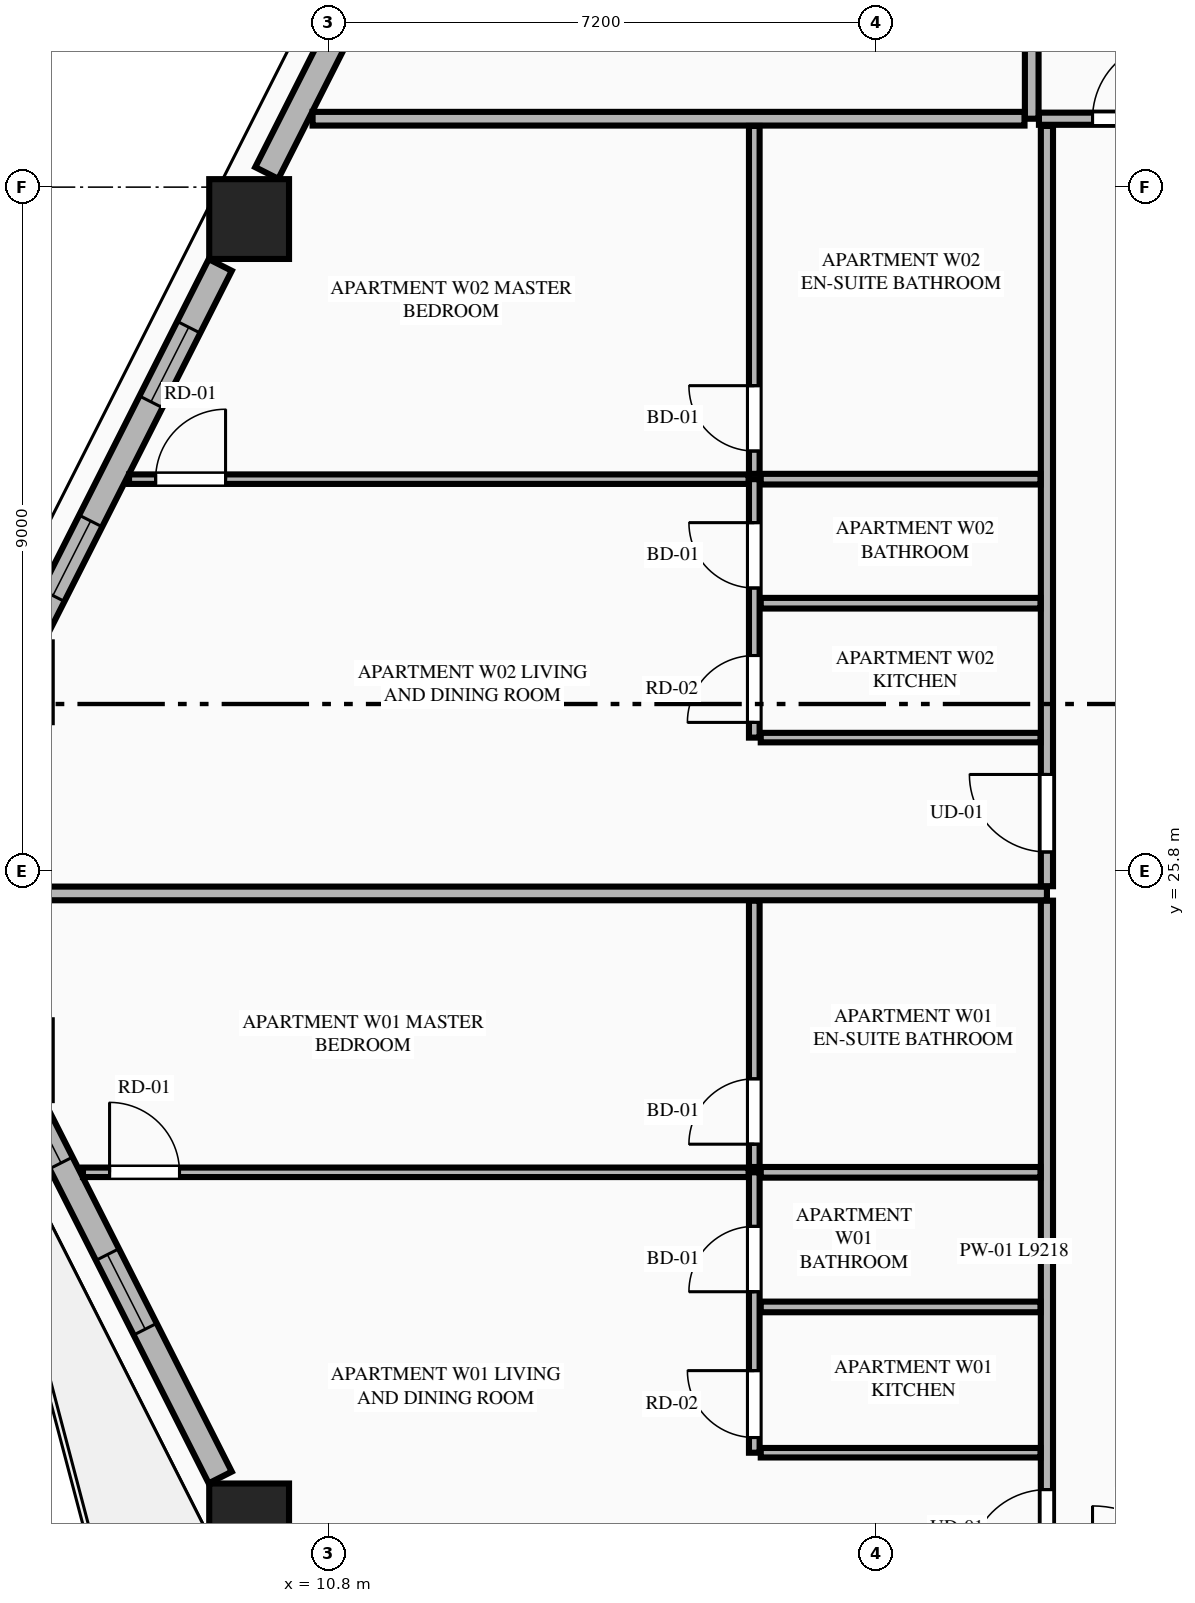
"""IFC4 building model, lengths in metres.
Left out: names, types, materials, properties, quantities, classifications, styles, units other than length and angle.
Written with IfcOpenShell. Run it as: python <this file> out.ifc"""

import sys

from ifc_helpers import new_model, si_unit, direction, frame, frame_2d, origin, origin_2d, place, context, subcontext, project, spatial, rectangle, extrude, element, fill, save


model = new_model("IFC4")
c1 = context("Model", 3, precision=1e-05, world=origin(), true_north=direction((0.0, 1.0)))
c2 = subcontext(c1, "Body", "Model", "MODEL_VIEW")
j1 = project(units=[si_unit("LENGTHUNIT", "METRE"), si_unit("PLANEANGLEUNIT", "RADIAN")], contexts=[c1])
p1 = place(None, origin())
s1 = spatial("IfcSite", under=j1, at=p1, CompositionType="ELEMENT")
p2 = place(p1, origin())
s2 = spatial("IfcBuilding", under=s1, at=p2, CompositionType="ELEMENT")
p3 = place(p2, frame((0.0, 0.0, 90.65)))
s3 = spatial("IfcBuildingStorey", under=s2, at=p3, CompositionType="ELEMENT", Elevation=90.65)
for number, where, z_axis, x_axis in (
    (1, (9.754, 34.38, 0.0), (0.0, 0.0, 1.0), (1.0, 0.0, 0.0)),
    (2, (9.754, 17.22, 0.0), (0.0, 0.0, 1.0), (1.0, 0.0, 0.0)),
):
    element("IfcColumn", number, at=place(p3, frame(where, z_axis=z_axis, x_axis=x_axis)), inside=s3, PredefinedType="COLUMN", context=c2, shape_type="SweptSolid", body=[
        extrude(rectangle(XDim=1.05, YDim=1.05, at=origin_2d()), origin(), (0.0, 0.0, 1.0), 3.55),
    ])
p4 = place(p3, frame((12.567, 40.085, 0.0), z_axis=(0.0, 0.0, 1.0), x_axis=(-0.451599886425, -0.892220568347, 0.0)))
e3 = element("IfcWall", 3, at=p4, inside=s3, PredefinedType="STANDARD", context=c2, shape_type="SweptSolid", body=[
    extrude(rectangle(XDim=5.715, YDim=0.34, at=frame_2d((2.857, 0.0))), origin(), (0.0, 0.0, 1.0), 2.712),
])
p5 = place(p4, frame((2.308, 0.0, 0.75)))
e4 = element("IfcOpeningElement", 4, at=p5, cuts=e3, PredefinedType="OPENING", context=c2, shape_type="SweptSolid", body=[
    extrude(rectangle(XDim=1.1, YDim=1.812, at=frame_2d((0.55, 0.906))), frame((0.0, 0.18, 0.0), z_axis=(0.0, -1.0, 0.0), x_axis=(1.0, 0.0, 0.0)), (0.0, 0.0, 1.0), 0.36),
])
p6 = place(p3, frame((9.374, 33.776, 0.0), z_axis=(0.0, 0.0, 1.0), x_axis=(-0.451597066012, -0.892221995901, 0.0)))
e5 = element("IfcWall", 5, at=p6, inside=s3, PredefinedType="STANDARD", context=c2, shape_type="SweptSolid", body=[
    extrude(rectangle(XDim=5.474, YDim=0.34, at=frame_2d((2.737, 0.0))), origin(), (0.0, 0.0, 1.0), 2.712),
])
p7 = place(p6, frame((0.918, 0.0, 0.75)))
e6 = element("IfcOpeningElement", 6, at=p7, cuts=e5, PredefinedType="OPENING", context=c2, shape_type="SweptSolid", body=[
    extrude(rectangle(XDim=1.1, YDim=1.812, at=frame_2d((0.55, 0.906))), frame((0.0, 0.18, 0.0), z_axis=(0.0, -1.0, 0.0), x_axis=(1.0, 0.0, 0.0)), (0.0, 0.0, 1.0), 0.36),
])
p8 = place(p6, frame((3.775, 0.0, 0.75)))
e7 = element("IfcOpeningElement", 7, at=p8, cuts=e5, PredefinedType="OPENING", context=c2, shape_type="SweptSolid", body=[
    extrude(rectangle(XDim=1.1, YDim=1.812, at=frame_2d((0.55, 0.906))), frame((0.0, 0.18, 0.0), z_axis=(0.0, -1.0, 0.0), x_axis=(1.0, 0.0, 0.0)), (0.0, 0.0, 1.0), 0.36),
])
p9 = place(p3, frame((6.902, 22.708, 0.0), z_axis=(0.0, 0.0, 1.0), x_axis=(0.451579095309, -0.892231091523, 0.0)))
e8 = element("IfcWall", 8, at=p9, inside=s3, PredefinedType="STANDARD", context=c2, shape_type="SweptSolid", body=[
    extrude(rectangle(XDim=5.474, YDim=0.34, at=frame_2d((2.737, 0.0))), origin(), (0.0, 0.0, 1.0), 2.712),
])
p10 = place(p9, frame((2.187, 0.0, 0.75)))
e9 = element("IfcOpeningElement", 9, at=p10, cuts=e8, PredefinedType="OPENING", context=c2, shape_type="SweptSolid", body=[
    extrude(rectangle(XDim=1.1, YDim=1.812, at=frame_2d((0.55, 0.906))), frame((0.0, 0.18, 0.0), z_axis=(0.0, -1.0, 0.0), x_axis=(1.0, 0.0, 0.0)), (0.0, 0.0, 1.0), 0.36),
])
p11 = place(p9, frame((0.21, 0.0, 0.75)))
e10 = element("IfcOpeningElement", 10, at=p11, cuts=e8, PredefinedType="OPENING", context=c2, shape_type="SweptSolid", body=[
    extrude(rectangle(XDim=0.626, YDim=1.812, at=frame_2d((0.313, 0.906))), frame((0.0, 0.18, 0.0), z_axis=(0.0, -1.0, 0.0), x_axis=(1.0, 0.0, 0.0)), (0.0, 0.0, 1.0), 0.36),
])
p12 = place(p3, frame((20.05, 35.7, 0.0), z_axis=(0.0, 0.0, 1.0), x_axis=(0.0, 1.0, 0.0)))
e11 = element("IfcWall", 11, at=p12, inside=s3, PredefinedType="PARTITIONING", context=c2, shape_type="SweptSolid", body=[
    extrude(rectangle(XDim=13.445, YDim=0.18, at=frame_2d((6.723, 0.0))), origin(), (0.0, 0.0, 1.0), 3.33),
])
p13 = place(p3, frame((20.145, 35.7, 0.0), z_axis=(0.0, 0.0, 1.0), x_axis=(1.0, 0.0, 0.0)))
e12 = element("IfcWall", 12, at=p13, inside=s3, PredefinedType="PARTITIONING", context=c2, shape_type="SweptSolid", body=[
    extrude(rectangle(XDim=24.51, YDim=0.16, at=frame_2d((12.255, 0.0))), origin(), (0.0, 0.0, 1.0), 3.33),
])
p14 = place(p13, frame((0.705, 0.0, 0.0)))
e13 = element("IfcOpeningElement", 13, at=p14, cuts=e12, PredefinedType="OPENING", context=c2, shape_type="SweptSolid", body=[
    extrude(rectangle(XDim=1.02, YDim=2.25, at=frame_2d((0.51, 1.125))), frame((0.0, 0.09, 0.0), z_axis=(0.0, -1.0, 0.0), x_axis=(1.0, 0.0, 0.0)), (0.0, 0.0, 1.0), 0.18),
])
p15 = place(p3, frame((10.589, 35.7, 0.0), z_axis=(0.0, 0.0, 1.0), x_axis=(1.0, 0.0, 0.0)))
e14 = element("IfcWall", 14, at=p15, inside=s3, PredefinedType="PARTITIONING", context=c2, shape_type="SweptSolid", body=[
    extrude(rectangle(XDim=9.366, YDim=0.18, at=frame_2d((4.683, 0.0))), origin(), (0.0, 0.0, 1.0), 3.33),
])
p16 = place(p3, frame((20.25, 16.195, 0.0), z_axis=(0.0, 0.0, 1.0), x_axis=(0.0, 1.0, 0.0)))
e15 = element("IfcWall", 15, at=p16, inside=s3, PredefinedType="PARTITIONING", context=c2, shape_type="SweptSolid", body=[
    extrude(rectangle(XDim=9.218, YDim=0.16, at=frame_2d((4.609, 0.0))), origin(), (0.0, 0.0, 1.0), 2.637),
])
p17 = place(p16, frame((0.45, 0.0, 0.0)))
e16 = element("IfcOpeningElement", 16, at=p17, cuts=e15, PredefinedType="OPENING", context=c2, shape_type="SweptSolid", body=[
    extrude(rectangle(XDim=1.02, YDim=2.25, at=frame_2d((0.51, 1.125))), frame((0.0, 0.09, 0.0), z_axis=(0.0, -1.0, 0.0), x_axis=(1.0, 0.0, 0.0)), (0.0, 0.0, 1.0), 0.18),
])
p18 = place(p3, frame((16.485, 18.15, 0.0), z_axis=(0.0, 0.0, 1.0), x_axis=(1.0, 0.0, 0.0)))
e17 = element("IfcWall", 17, at=p18, inside=s3, PredefinedType="PARTITIONING", context=c2, shape_type="SweptSolid", body=[
    extrude(rectangle(XDim=3.68, YDim=0.125, at=frame_2d((1.84, 0.0))), origin(), (0.0, 0.0, 1.0), 2.637),
])
p19 = place(p3, frame((16.4, 18.15, 0.0), z_axis=(0.0, 0.0, 1.0), x_axis=(0.0, 1.0, 0.0)))
e18 = element("IfcWall", 18, at=p19, inside=s3, PredefinedType="PLUMBINGWALL", context=c2, shape_type="SweptSolid", body=[
    extrude(rectangle(XDim=3.689, YDim=0.14, at=frame_2d((1.845, 0.0))), origin(), (0.0, 0.0, 1.0), 3.33),
])
p20 = place(p19, frame((0.2, 0.0, 0.0)))
e19 = element("IfcOpeningElement", 19, at=p20, cuts=e18, PredefinedType="OPENING", context=c2, shape_type="SweptSolid", body=[
    extrude(rectangle(XDim=0.88, YDim=2.15, at=frame_2d((0.44, 1.075))), frame((0.0, 0.08, 0.0), z_axis=(0.0, -1.0, 0.0), x_axis=(1.0, 0.0, 0.0)), (0.0, 0.0, 1.0), 0.16),
])
p21 = place(p19, frame((2.118, 0.0, 0.0)))
e20 = element("IfcOpeningElement", 20, at=p21, cuts=e18, PredefinedType="OPENING", context=c2, shape_type="SweptSolid", body=[
    extrude(rectangle(XDim=0.86, YDim=2.1, at=frame_2d((0.43, 1.05))), frame((0.0, 0.08, 0.0), z_axis=(0.0, -1.0, 0.0), x_axis=(1.0, 0.0, 0.0)), (0.0, 0.0, 1.0), 0.16),
])
p22 = place(p3, frame((16.4, 21.909, 0.0), z_axis=(0.0, 0.0, 1.0), x_axis=(0.0, 1.0, 0.0)))
e21 = element("IfcWall", 21, at=p22, inside=s3, PredefinedType="PLUMBINGWALL", context=c2, shape_type="SweptSolid", body=[
    extrude(rectangle(XDim=3.504, YDim=0.14, at=frame_2d((1.752, 0.0))), origin(), (0.0, 0.0, 1.0), 3.33),
])
p23 = place(p22, frame((0.3, 0.0, 0.0)))
e22 = element("IfcOpeningElement", 22, at=p23, cuts=e21, PredefinedType="OPENING", context=c2, shape_type="SweptSolid", body=[
    extrude(rectangle(XDim=0.86, YDim=2.1, at=frame_2d((0.43, 1.05))), frame((0.0, 0.08, 0.0), z_axis=(0.0, -1.0, 0.0), x_axis=(1.0, 0.0, 0.0)), (0.0, 0.0, 1.0), 0.16),
])
p24 = place(p3, frame((16.485, 21.839, 0.0), z_axis=(0.0, 0.0, 1.0), x_axis=(1.0, 0.0, 0.0)))
e23 = element("IfcWall", 23, at=p24, inside=s3, PredefinedType="PLUMBINGWALL", context=c2, shape_type="SweptSolid", body=[
    extrude(rectangle(XDim=3.68, YDim=0.14, at=frame_2d((1.84, 0.0))), origin(), (0.0, 0.0, 1.0), 3.33),
])
p25 = place(p3, frame((7.568, 21.839, 0.0), z_axis=(0.0, 0.0, 1.0), x_axis=(1.0, 0.0, 0.0)))
e24 = element("IfcWall", 24, at=p25, inside=s3, PredefinedType="PARTITIONING", context=c2, shape_type="SweptSolid", body=[
    extrude(rectangle(XDim=8.757, YDim=0.125, at=frame_2d((4.378, 0.0))), origin(), (0.0, 0.0, 1.0), 3.33),
])
p26 = place(p25, frame((0.35, 0.0, 0.0)))
e25 = element("IfcOpeningElement", 25, at=p26, cuts=e24, PredefinedType="OPENING", context=c2, shape_type="SweptSolid", body=[
    extrude(rectangle(XDim=0.92, YDim=2.15, at=frame_2d((0.46, 1.075))), frame((0.0, 0.073, 0.0), z_axis=(0.0, -1.0, 0.0), x_axis=(1.0, 0.0, 0.0)), (0.0, 0.0, 1.0), 0.145),
])
p27 = place(p3, frame((16.485, 20.068, 0.0), z_axis=(0.0, 0.0, 1.0), x_axis=(1.0, 0.0, 0.0)))
e26 = element("IfcWall", 26, at=p27, inside=s3, PredefinedType="PLUMBINGWALL", context=c2, shape_type="SweptSolid", body=[
    extrude(rectangle(XDim=3.68, YDim=0.14, at=frame_2d((1.84, 0.0))), origin(), (0.0, 0.0, 1.0), 3.33),
])
p28 = place(p3, frame((6.087, 25.508, 0.0), z_axis=(0.0, 0.0, 1.0), x_axis=(1.0, 0.0, 0.0)))
e27 = element("IfcWall", 27, at=p28, inside=s3, PredefinedType="PARTITIONING", context=c2, shape_type="SweptSolid", body=[
    extrude(rectangle(XDim=14.163, YDim=0.18, at=frame_2d((7.082, 0.0))), origin(), (0.0, 0.0, 1.0), 3.33),
])
p29 = place(p3, frame((20.25, 25.603, 0.0), z_axis=(0.0, 0.0, 1.0), x_axis=(0.0, 1.0, 0.0)))
e28 = element("IfcWall", 28, at=p29, inside=s3, PredefinedType="PARTITIONING", context=c2, shape_type="SweptSolid", body=[
    extrude(rectangle(XDim=10.002, YDim=0.16, at=frame_2d((5.001, 0.0))), origin(), (0.0, 0.0, 1.0), 2.637),
])
p30 = place(p29, frame((0.45, 0.0, 0.0)))
e29 = element("IfcOpeningElement", 29, at=p30, cuts=e28, PredefinedType="OPENING", context=c2, shape_type="SweptSolid", body=[
    extrude(rectangle(XDim=1.02, YDim=2.25, at=frame_2d((0.51, 1.125))), frame((0.0, 0.09, 0.0), z_axis=(0.0, -1.0, 0.0), x_axis=(1.0, 0.0, 0.0)), (0.0, 0.0, 1.0), 0.18),
])
p31 = place(p3, frame((16.485, 27.558, 0.0), z_axis=(0.0, 0.0, 1.0), x_axis=(1.0, 0.0, 0.0)))
e30 = element("IfcWall", 30, at=p31, inside=s3, PredefinedType="PARTITIONING", context=c2, shape_type="SweptSolid", body=[
    extrude(rectangle(XDim=3.68, YDim=0.125, at=frame_2d((1.84, 0.0))), origin(), (0.0, 0.0, 1.0), 3.33),
])
p32 = place(p3, frame((16.4, 27.558, 0.0), z_axis=(0.0, 0.0, 1.0), x_axis=(0.0, 1.0, 0.0)))
e31 = element("IfcWall", 31, at=p32, inside=s3, PredefinedType="PLUMBINGWALL", context=c2, shape_type="SweptSolid", body=[
    extrude(rectangle(XDim=3.4, YDim=0.14, at=frame_2d((1.7, 0.0))), origin(), (0.0, 0.0, 1.0), 3.33),
])
p33 = place(p32, frame((0.2, 0.0, 0.0)))
e32 = element("IfcOpeningElement", 32, at=p33, cuts=e31, PredefinedType="OPENING", context=c2, shape_type="SweptSolid", body=[
    extrude(rectangle(XDim=0.88, YDim=2.15, at=frame_2d((0.44, 1.075))), frame((0.0, 0.08, 0.0), z_axis=(0.0, -1.0, 0.0), x_axis=(1.0, 0.0, 0.0)), (0.0, 0.0, 1.0), 0.16),
])
p34 = place(p32, frame((1.968, 0.0, 0.0)))
e33 = element("IfcOpeningElement", 33, at=p34, cuts=e31, PredefinedType="OPENING", context=c2, shape_type="SweptSolid", body=[
    extrude(rectangle(XDim=0.86, YDim=2.1, at=frame_2d((0.43, 1.05))), frame((0.0, 0.08, 0.0), z_axis=(0.0, -1.0, 0.0), x_axis=(1.0, 0.0, 0.0)), (0.0, 0.0, 1.0), 0.16),
])
p35 = place(p3, frame((16.4, 31.028, 0.0), z_axis=(0.0, 0.0, 1.0), x_axis=(0.0, 1.0, 0.0)))
e34 = element("IfcWall", 34, at=p35, inside=s3, PredefinedType="PLUMBINGWALL", context=c2, shape_type="SweptSolid", body=[
    extrude(rectangle(XDim=4.577, YDim=0.14, at=frame_2d((2.289, 0.0))), origin(), (0.0, 0.0, 1.0), 3.33),
])
p36 = place(p35, frame((0.3, 0.0, 0.0)))
e35 = element("IfcOpeningElement", 35, at=p36, cuts=e34, PredefinedType="OPENING", context=c2, shape_type="SweptSolid", body=[
    extrude(rectangle(XDim=0.86, YDim=2.1, at=frame_2d((0.43, 1.05))), frame((0.0, 0.08, 0.0), z_axis=(0.0, -1.0, 0.0), x_axis=(1.0, 0.0, 0.0)), (0.0, 0.0, 1.0), 0.16),
])
p37 = place(p3, frame((16.485, 30.958, 0.0), z_axis=(0.0, 0.0, 1.0), x_axis=(1.0, 0.0, 0.0)))
e36 = element("IfcWall", 36, at=p37, inside=s3, PredefinedType="PLUMBINGWALL", context=c2, shape_type="SweptSolid", body=[
    extrude(rectangle(XDim=3.68, YDim=0.14, at=frame_2d((1.84, 0.0))), origin(), (0.0, 0.0, 1.0), 3.33),
])
p38 = place(p3, frame((8.174, 30.958, 0.0), z_axis=(0.0, 0.0, 1.0), x_axis=(1.0, 0.0, 0.0)))
e37 = element("IfcWall", 37, at=p38, inside=s3, PredefinedType="PARTITIONING", context=c2, shape_type="SweptSolid", body=[
    extrude(rectangle(XDim=8.151, YDim=0.125, at=frame_2d((4.075, 0.0))), origin(), (0.0, 0.0, 1.0), 3.33),
])
p39 = place(p38, frame((0.35, 0.0, 0.0)))
e38 = element("IfcOpeningElement", 38, at=p39, cuts=e37, PredefinedType="OPENING", context=c2, shape_type="SweptSolid", body=[
    extrude(rectangle(XDim=0.92, YDim=2.15, at=frame_2d((0.46, 1.075))), frame((0.0, 0.073, 0.0), z_axis=(0.0, -1.0, 0.0), x_axis=(1.0, 0.0, 0.0)), (0.0, 0.0, 1.0), 0.145),
])
p40 = place(p3, frame((16.485, 29.326, 0.0), z_axis=(0.0, 0.0, 1.0), x_axis=(1.0, 0.0, 0.0)))
e39 = element("IfcWall", 39, at=p40, inside=s3, PredefinedType="PLUMBINGWALL", context=c2, shape_type="SweptSolid", body=[
    extrude(rectangle(XDim=3.68, YDim=0.14, at=frame_2d((1.84, 0.0))), origin(), (0.0, 0.0, 1.0), 3.33),
])
p41 = place(p7, origin())
e40 = element("IfcWindow", 40, at=p41, inside=s3, PartitioningType="SINGLE_PANEL", PredefinedType="WINDOW", context=c2, shape_type="SweptSolid", body=[
    extrude(rectangle(XDim=1.1, YDim=1.812, at=frame_2d((0.55, 0.906))), frame((0.0, 0.03, 0.0), z_axis=(0.0, -1.0, 0.0), x_axis=(1.0, 0.0, 0.0)), (0.0, 0.0, 1.0), 0.06),
])
fill(e6, e40)
p42 = place(p10, origin())
e41 = element("IfcWindow", 41, at=p42, inside=s3, PartitioningType="SINGLE_PANEL", PredefinedType="WINDOW", context=c2, shape_type="SweptSolid", body=[
    extrude(rectangle(XDim=1.1, YDim=1.812, at=frame_2d((0.55, 0.906))), frame((0.0, 0.03, 0.0), z_axis=(0.0, -1.0, 0.0), x_axis=(1.0, 0.0, 0.0)), (0.0, 0.0, 1.0), 0.06),
])
fill(e9, e41)
p43 = place(p14, origin())
e42 = element("IfcDoor", 42, at=p43, inside=s3, OperationType="SINGLE_SWING_RIGHT", PredefinedType="DOOR", context=c2, shape_type="SweptSolid", body=[
    extrude(rectangle(XDim=1.02, YDim=2.25, at=frame_2d((0.51, 1.125))), frame((0.0, 0.025, 0.0), z_axis=(0.0, -1.0, 0.0), x_axis=(1.0, 0.0, 0.0)), (0.0, 0.0, 1.0), 0.05),
])
fill(e13, e42)
p44 = place(p20, origin())
e43 = element("IfcDoor", 43, at=p44, inside=s3, OperationType="SINGLE_SWING_RIGHT", PredefinedType="DOOR", context=c2, shape_type="SweptSolid", body=[
    extrude(rectangle(XDim=0.88, YDim=2.15, at=frame_2d((0.44, 1.075))), frame((0.0, 0.025, 0.0), z_axis=(0.0, -1.0, 0.0), x_axis=(1.0, 0.0, 0.0)), (0.0, 0.0, 1.0), 0.05),
])
fill(e19, e43)
p45 = place(p21, origin())
e44 = element("IfcDoor", 44, at=p45, inside=s3, OperationType="SINGLE_SWING_LEFT", PredefinedType="DOOR", context=c2, shape_type="SweptSolid", body=[
    extrude(rectangle(XDim=0.86, YDim=2.1, at=frame_2d((0.43, 1.05))), frame((0.0, 0.025, 0.0), z_axis=(0.0, -1.0, 0.0), x_axis=(1.0, 0.0, 0.0)), (0.0, 0.0, 1.0), 0.05),
])
fill(e20, e44)
p46 = place(p23, origin())
e45 = element("IfcDoor", 45, at=p46, inside=s3, OperationType="SINGLE_SWING_LEFT", PredefinedType="DOOR", context=c2, shape_type="SweptSolid", body=[
    extrude(rectangle(XDim=0.86, YDim=2.1, at=frame_2d((0.43, 1.05))), frame((0.0, 0.025, 0.0), z_axis=(0.0, -1.0, 0.0), x_axis=(1.0, 0.0, 0.0)), (0.0, 0.0, 1.0), 0.05),
])
fill(e22, e45)
p47 = place(p17, origin())
e46 = element("IfcDoor", 46, at=p47, inside=s3, OperationType="SINGLE_SWING_LEFT", PredefinedType="DOOR", context=c2, shape_type="SweptSolid", body=[
    extrude(rectangle(XDim=1.02, YDim=2.25, at=frame_2d((0.51, 1.125))), frame((0.0, 0.025, 0.0), z_axis=(0.0, -1.0, 0.0), x_axis=(1.0, 0.0, 0.0)), (0.0, 0.0, 1.0), 0.05),
])
fill(e16, e46)
p48 = place(p26, origin())
e47 = element("IfcDoor", 47, at=p48, inside=s3, OperationType="SINGLE_SWING_LEFT", PredefinedType="DOOR", context=c2, shape_type="SweptSolid", body=[
    extrude(rectangle(XDim=0.92, YDim=2.15, at=frame_2d((0.46, 1.075))), frame((0.0, 0.025, 0.0), z_axis=(0.0, -1.0, 0.0), x_axis=(1.0, 0.0, 0.0)), (0.0, 0.0, 1.0), 0.05),
])
fill(e25, e47)
p49 = place(p33, origin())
e48 = element("IfcDoor", 48, at=p49, inside=s3, OperationType="SINGLE_SWING_LEFT", PredefinedType="DOOR", context=c2, shape_type="SweptSolid", body=[
    extrude(rectangle(XDim=0.88, YDim=2.15, at=frame_2d((0.44, 1.075))), frame((0.0, 0.025, 0.0), z_axis=(0.0, -1.0, 0.0), x_axis=(1.0, 0.0, 0.0)), (0.0, 0.0, 1.0), 0.05),
])
fill(e32, e48)
p50 = place(p34, origin())
e49 = element("IfcDoor", 49, at=p50, inside=s3, OperationType="SINGLE_SWING_RIGHT", PredefinedType="DOOR", context=c2, shape_type="SweptSolid", body=[
    extrude(rectangle(XDim=0.86, YDim=2.1, at=frame_2d((0.43, 1.05))), frame((0.0, 0.025, 0.0), z_axis=(0.0, -1.0, 0.0), x_axis=(1.0, 0.0, 0.0)), (0.0, 0.0, 1.0), 0.05),
])
fill(e33, e49)
p51 = place(p36, origin())
e50 = element("IfcDoor", 50, at=p51, inside=s3, OperationType="SINGLE_SWING_RIGHT", PredefinedType="DOOR", context=c2, shape_type="SweptSolid", body=[
    extrude(rectangle(XDim=0.86, YDim=2.1, at=frame_2d((0.43, 1.05))), frame((0.0, 0.025, 0.0), z_axis=(0.0, -1.0, 0.0), x_axis=(1.0, 0.0, 0.0)), (0.0, 0.0, 1.0), 0.05),
])
fill(e35, e50)
p52 = place(p30, origin())
e51 = element("IfcDoor", 51, at=p52, inside=s3, OperationType="SINGLE_SWING_RIGHT", PredefinedType="DOOR", context=c2, shape_type="SweptSolid", body=[
    extrude(rectangle(XDim=1.02, YDim=2.25, at=frame_2d((0.51, 1.125))), frame((0.0, 0.025, 0.0), z_axis=(0.0, -1.0, 0.0), x_axis=(1.0, 0.0, 0.0)), (0.0, 0.0, 1.0), 0.05),
])
fill(e29, e51)
p53 = place(p39, origin())
e52 = element("IfcDoor", 52, at=p53, inside=s3, OperationType="SINGLE_SWING_RIGHT", PredefinedType="DOOR", context=c2, shape_type="SweptSolid", body=[
    extrude(rectangle(XDim=0.92, YDim=2.15, at=frame_2d((0.46, 1.075))), frame((0.0, 0.025, 0.0), z_axis=(0.0, -1.0, 0.0), x_axis=(1.0, 0.0, 0.0)), (0.0, 0.0, 1.0), 0.05),
])
fill(e38, e52)
p54 = place(p8, origin())
e53 = element("IfcWindow", 53, at=p54, inside=s3, PartitioningType="SINGLE_PANEL", PredefinedType="WINDOW", context=c2, shape_type="SweptSolid", body=[
    extrude(rectangle(XDim=1.1, YDim=1.812, at=frame_2d((0.55, 0.906))), frame((0.0, 0.03, 0.0), z_axis=(0.0, -1.0, 0.0), x_axis=(1.0, 0.0, 0.0)), (0.0, 0.0, 1.0), 0.06),
])
fill(e7, e53)
p55 = place(p11, origin())
e54 = element("IfcWindow", 54, at=p55, inside=s3, PartitioningType="SINGLE_PANEL", PredefinedType="WINDOW", context=c2, shape_type="SweptSolid", body=[
    extrude(rectangle(XDim=0.626, YDim=1.812, at=frame_2d((0.313, 0.906))), frame((0.0, 0.03, 0.0), z_axis=(0.0, -1.0, 0.0), x_axis=(1.0, 0.0, 0.0)), (0.0, 0.0, 1.0), 0.06),
])
fill(e10, e54)
save(model, sys.argv[1])
